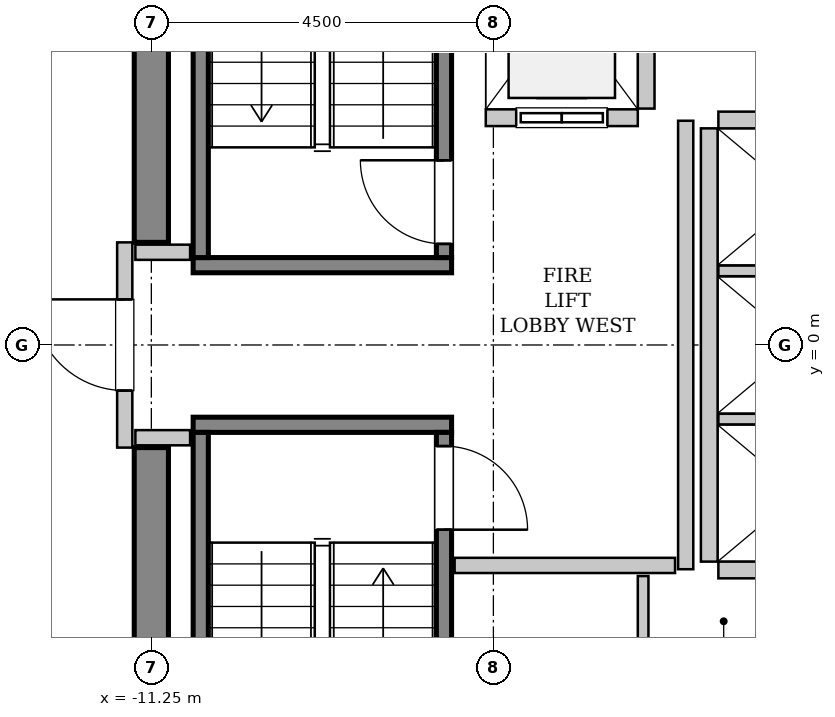
"""IFC4 building model, lengths in metres.
Left out: names, types, materials, properties, quantities, classifications, styles, units other than length and angle.
Written with IfcOpenShell. Run it as: python <this file> out.ifc"""

import sys

from ifc_helpers import new_model, si_unit, direction, frame, frame_2d, origin, place, context, subcontext, project, spatial, rectangle, extrude, source, transform, mapped, element, fill, save


model = new_model("IFC4")
c1 = context("Model", 3, precision=1e-05, world=origin(), true_north=direction((0.0, 1.0)))
c2 = subcontext(c1, "Body", "Model", "MODEL_VIEW")
j1 = project(units=[si_unit("LENGTHUNIT", "METRE"), si_unit("PLANEANGLEUNIT", "RADIAN")], contexts=[c1])
p1 = place(None, origin())
s1 = spatial("IfcSite", under=j1, at=p1, CompositionType="ELEMENT")
p2 = place(p1, origin())
s2 = spatial("IfcBuilding", under=s1, at=p2, CompositionType="ELEMENT")
p3 = place(p2, frame((0.0, 0.0, 256.0)))
s3 = spatial("IfcBuildingStorey", under=s2, at=p3, CompositionType="ELEMENT", Elevation=256.0)
m1 = source(origin(), c2, "Body", "SweptSolid", [
    extrude(rectangle(XDim=7.425, YDim=0.45, at=frame_2d((3.712, 0.0))), origin(), (0.0, 0.0, 1.0), 3.8),
])
for number, where, z_axis, x_axis in (
    (1, (-11.25, -8.775, 0.0), (0.0, 0.0, 1.0), (0.0, 1.0, 0.0)),
    (2, (-11.25, 1.35, 0.0), (0.0, 0.0, 1.0), (0.0, 1.0, 0.0)),
):
    element("IfcWall", number, at=place(p3, frame(where, z_axis=z_axis, x_axis=x_axis)), inside=s3, PredefinedType="SHEAR", context=c2, shape_type="MappedRepresentation", body=[
        mapped(m1, transform((0.0, 0.0, 0.0), x_axis=(1.0, 0.0, 0.0), y_axis=(0.0, 1.0, 0.0), z_axis=(0.0, 0.0, 1.0), scale=1.0)),
    ])
m2 = source(origin(), c2, "Body", "SweptSolid", [
    extrude(rectangle(XDim=3.4, YDim=0.2, at=frame_2d((1.7, 0.0))), origin(), (0.0, 0.0, 1.0), 3.8),
])
p4 = place(p3, frame((-7.3, 1.05, 0.0), z_axis=(0.0, 0.0, 1.0), x_axis=(-1.0, 0.0, 0.0)))
e3 = element("IfcWall", 3, at=p4, inside=s3, PredefinedType="SOLIDWALL", context=c2, shape_type="MappedRepresentation", body=[
    mapped(m2, transform((0.0, 0.0, 0.0), x_axis=(1.0, 0.0, 0.0), y_axis=(0.0, 1.0, 0.0), z_axis=(0.0, 0.0, 1.0), scale=1.0)),
])
m3 = source(origin(), c2, "Body", "SweptSolid", [
    extrude(rectangle(XDim=7.1, YDim=0.2, at=frame_2d((3.55, 0.0))), origin(), (0.0, 0.0, 1.0), 3.8),
])
p5 = place(p3, frame((-7.4, 1.15, 0.0), z_axis=(0.0, 0.0, 1.0), x_axis=(0.0, 1.0, 0.0)))
e4 = element("IfcWall", 4, at=p5, inside=s3, PredefinedType="SOLIDWALL", context=c2, shape_type="MappedRepresentation", body=[
    mapped(m3, transform((0.0, 0.0, 0.0), x_axis=(1.0, 0.0, 0.0), y_axis=(0.0, 1.0, 0.0), z_axis=(0.0, 0.0, 1.0), scale=1.0)),
])
p6 = place(p5, frame((0.18, 0.0, 0.0)))
e5 = element("IfcOpeningElement", 5, at=p6, cuts=e4, PredefinedType="OPENING", context=c2, shape_type="SweptSolid", body=[
    extrude(rectangle(XDim=1.1, YDim=2.15, at=frame_2d((0.55, 1.075))), frame((0.0, 0.11, 0.0), z_axis=(0.0, -1.0, 0.0), x_axis=(1.0, 0.0, 0.0)), (0.0, 0.0, 1.0), 0.22),
])
p7 = place(p3, frame((-10.6, 1.15, 0.0), z_axis=(0.0, 0.0, 1.0), x_axis=(0.0, 1.0, 0.0)))
e6 = element("IfcWall", 6, at=p7, inside=s3, PredefinedType="SOLIDWALL", context=c2, shape_type="MappedRepresentation", body=[
    mapped(m3, transform((0.0, 0.0, 0.0), x_axis=(1.0, 0.0, 0.0), y_axis=(0.0, 1.0, 0.0), z_axis=(0.0, 0.0, 1.0), scale=1.0)),
])
p8 = place(p3, frame((-10.7, -1.05, 0.0), z_axis=(0.0, 0.0, 1.0), x_axis=(1.0, 0.0, 0.0)))
e7 = element("IfcWall", 7, at=p8, inside=s3, PredefinedType="SOLIDWALL", context=c2, shape_type="MappedRepresentation", body=[
    mapped(m2, transform((0.0, 0.0, 0.0), x_axis=(1.0, 0.0, 0.0), y_axis=(0.0, 1.0, 0.0), z_axis=(0.0, 0.0, 1.0), scale=1.0)),
])
p9 = place(p3, frame((-10.6, -1.15, 0.0), z_axis=(0.0, 0.0, 1.0), x_axis=(0.0, -1.0, 0.0)))
e8 = element("IfcWall", 8, at=p9, inside=s3, PredefinedType="SOLIDWALL", context=c2, shape_type="MappedRepresentation", body=[
    mapped(m3, transform((0.0, 0.0, 0.0), x_axis=(1.0, 0.0, 0.0), y_axis=(0.0, 1.0, 0.0), z_axis=(0.0, 0.0, 1.0), scale=1.0)),
])
p10 = place(p3, frame((-7.4, -1.15, 0.0), z_axis=(0.0, 0.0, 1.0), x_axis=(0.0, -1.0, 0.0)))
e9 = element("IfcWall", 9, at=p10, inside=s3, PredefinedType="SOLIDWALL", context=c2, shape_type="MappedRepresentation", body=[
    mapped(m3, transform((0.0, 0.0, 0.0), x_axis=(1.0, 0.0, 0.0), y_axis=(0.0, 1.0, 0.0), z_axis=(0.0, 0.0, 1.0), scale=1.0)),
])
p11 = place(p10, frame((0.18, 0.0, 0.0)))
e10 = element("IfcOpeningElement", 10, at=p11, cuts=e9, PredefinedType="OPENING", context=c2, shape_type="SweptSolid", body=[
    extrude(rectangle(XDim=1.1, YDim=2.15, at=frame_2d((0.55, 1.075))), frame((0.0, 0.11, 0.0), z_axis=(0.0, -1.0, 0.0), x_axis=(1.0, 0.0, 0.0)), (0.0, 0.0, 1.0), 0.22),
])
m4 = source(origin(), c2, "Body", "SweptSolid", [
    extrude(rectangle(XDim=2.0, YDim=0.22, at=frame_2d((1.0, 0.0))), origin(), (0.0, 0.0, 1.0), 3.485),
])
p12 = place(p3, frame((-6.85, 2.99, 0.0), z_axis=(0.0, 0.0, 1.0), x_axis=(1.0, 0.0, 0.0)))
e11 = element("IfcWall", 11, at=p12, inside=s3, PredefinedType="SOLIDWALL", context=c2, shape_type="MappedRepresentation", body=[
    mapped(m4, transform((0.0, 0.0, 0.0), x_axis=(1.0, 0.0, 0.0), y_axis=(0.0, 1.0, 0.0), z_axis=(0.0, 0.0, 1.0), scale=1.0)),
])
p13 = place(p12, frame((0.4, 0.0, 0.0)))
e12 = element("IfcOpeningElement", 12, at=p13, cuts=e11, PredefinedType="OPENING", context=c2, shape_type="SweptSolid", body=[
    extrude(rectangle(XDim=1.2, YDim=2.2, at=frame_2d((0.6, 1.1))), frame((0.0, 0.12, 0.0), z_axis=(0.0, -1.0, 0.0), x_axis=(1.0, 0.0, 0.0)), (0.0, 0.0, 1.0), 0.24),
])
m5 = source(origin(), c2, "Body", "SweptSolid", [
    extrude(rectangle(XDim=2.68, YDim=0.22, at=frame_2d((1.34, 0.0))), origin(), (0.0, 0.0, 1.0), 3.485),
])
p14 = place(p3, frame((-4.74, 3.11, 0.0), z_axis=(0.0, 0.0, 1.0), x_axis=(0.0, 1.0, 0.0)))
e13 = element("IfcWall", 13, at=p14, inside=s3, PredefinedType="SOLIDWALL", context=c2, shape_type="MappedRepresentation", body=[
    mapped(m5, transform((0.0, 0.0, 0.0), x_axis=(1.0, 0.0, 0.0), y_axis=(0.0, 1.0, 0.0), z_axis=(0.0, 0.0, 1.0), scale=1.0)),
])
m6 = source(origin(), c2, "Body", "SweptSolid", [
    extrude(rectangle(XDim=5.7, YDim=0.22, at=frame_2d((2.85, 0.0))), origin(), (0.0, 0.0, 1.0), 3.485),
])
p15 = place(p3, frame((-3.91, 2.85, 0.0), z_axis=(0.0, 0.0, 1.0), x_axis=(0.0, -1.0, 0.0)))
e14 = element("IfcWall", 14, at=p15, inside=s3, PredefinedType="SOLIDWALL", context=c2, shape_type="MappedRepresentation", body=[
    mapped(m6, transform((0.0, 0.0, 0.0), x_axis=(1.0, 0.0, 0.0), y_axis=(0.0, 1.0, 0.0), z_axis=(0.0, 0.0, 1.0), scale=1.0)),
])
m7 = source(origin(), c2, "Body", "SweptSolid", [
    extrude(rectangle(XDim=2.13, YDim=0.22, at=frame_2d((1.065, 0.0))), origin(), (0.0, 0.0, 1.0), 3.485),
])
p16 = place(p3, frame((-3.79, -2.96, 0.0), z_axis=(0.0, 0.0, 1.0), x_axis=(1.0, 0.0, 0.0)))
e15 = element("IfcWall", 15, at=p16, inside=s3, PredefinedType="SOLIDWALL", context=c2, shape_type="MappedRepresentation", body=[
    mapped(m7, transform((0.0, 0.0, 0.0), x_axis=(1.0, 0.0, 0.0), y_axis=(0.0, 1.0, 0.0), z_axis=(0.0, 0.0, 1.0), scale=1.0)),
])
m8 = source(origin(), c2, "Body", "SweptSolid", [
    extrude(rectangle(XDim=2.13, YDim=0.14, at=frame_2d((1.065, 0.0))), origin(), (0.0, 0.0, 1.0), 3.485),
])
for number, where, z_axis, x_axis in (
    (16, (-3.79, -0.975, 0.0), (0.0, 0.0, 1.0), (1.0, 0.0, 0.0)),
    (17, (-3.79, 0.975, 0.0), (0.0, 0.0, 1.0), (1.0, 0.0, 0.0)),
):
    element("IfcWall", number, at=place(p3, frame(where, z_axis=z_axis, x_axis=x_axis)), inside=s3, PredefinedType="PARTITIONING", context=c2, shape_type="MappedRepresentation", body=[
        mapped(m8, transform((0.0, 0.0, 0.0), x_axis=(1.0, 0.0, 0.0), y_axis=(0.0, 1.0, 0.0), z_axis=(0.0, 0.0, 1.0), scale=1.0)),
    ])
p17 = place(p3, frame((-1.66, 2.96, 0.0), z_axis=(0.0, 0.0, 1.0), x_axis=(-1.0, 0.0, 0.0)))
e18 = element("IfcWall", 18, at=p17, inside=s3, PredefinedType="SOLIDWALL", context=c2, shape_type="MappedRepresentation", body=[
    mapped(m7, transform((0.0, 0.0, 0.0), x_axis=(1.0, 0.0, 0.0), y_axis=(0.0, 1.0, 0.0), z_axis=(0.0, 0.0, 1.0), scale=1.0)),
])
m9 = source(origin(), c2, "Body", "SweptSolid", [
    extrude(rectangle(XDim=2.7, YDim=0.2, at=frame_2d((1.35, 0.0))), origin(), (0.0, 0.0, 1.0), 2.575),
])
p18 = place(p3, frame((-11.6, -1.35, 0.0), z_axis=(0.0, 0.0, 1.0), x_axis=(0.0, 1.0, 0.0)))
e19 = element("IfcWall", 19, at=p18, inside=s3, PredefinedType="PARTITIONING", context=c2, shape_type="MappedRepresentation", body=[
    mapped(m9, transform((0.0, 0.0, 0.0), x_axis=(1.0, 0.0, 0.0), y_axis=(0.0, 1.0, 0.0), z_axis=(0.0, 0.0, 1.0), scale=1.0)),
])
p19 = place(p18, frame((0.75, 0.0, 0.0)))
e20 = element("IfcOpeningElement", 20, at=p19, cuts=e19, PredefinedType="OPENING", context=c2, shape_type="SweptSolid", body=[
    extrude(rectangle(XDim=1.2, YDim=2.15, at=frame_2d((0.6, 1.075))), frame((0.0, 0.11, 0.0), z_axis=(0.0, -1.0, 0.0), x_axis=(1.0, 0.0, 0.0)), (0.0, 0.0, 1.0), 0.22),
])
m10 = source(origin(), c2, "Body", "SweptSolid", [
    extrude(rectangle(XDim=5.9, YDim=0.2, at=frame_2d((2.95, 0.0))), origin(), (0.0, 0.0, 1.0), 3.485),
])
p20 = place(p3, frame((-4.22, -2.95, 0.0), z_axis=(0.0, 0.0, 1.0), x_axis=(0.0, 1.0, 0.0)))
e21 = element("IfcWall", 21, at=p20, inside=s3, PredefinedType="PARTITIONING", context=c2, shape_type="MappedRepresentation", body=[
    mapped(m10, transform((0.0, 0.0, 0.0), x_axis=(1.0, 0.0, 0.0), y_axis=(0.0, 1.0, 0.0), z_axis=(0.0, 0.0, 1.0), scale=1.0)),
])
m11 = source(origin(), c2, "Body", "SweptSolid", [
    extrude(rectangle(XDim=2.9, YDim=0.2, at=frame_2d((1.45, 0.0))), origin(), (0.0, 0.0, 1.0), 3.485),
])
p21 = place(p3, frame((-7.26, -2.9, 0.0), z_axis=(0.0, 0.0, 1.0), x_axis=(1.0, 0.0, 0.0)))
e22 = element("IfcWall", 22, at=p21, inside=s3, PredefinedType="PARTITIONING", context=c2, shape_type="MappedRepresentation", body=[
    mapped(m11, transform((0.0, 0.0, 0.0), x_axis=(1.0, 0.0, 0.0), y_axis=(0.0, 1.0, 0.0), z_axis=(0.0, 0.0, 1.0), scale=1.0)),
])
m12 = source(origin(), c2, "Body", "SweptSolid", [
    extrude(rectangle(XDim=0.72, YDim=0.2, at=frame_2d((0.36, 0.0))), origin(), (0.0, 0.0, 1.0), 3.485),
])
for number, where, z_axis, x_axis in (
    (23, (-11.46, 1.22, 0.0), (0.0, 0.0, 1.0), (1.0, 0.0, 0.0)),
    (24, (-11.46, -1.22, 0.0), (0.0, 0.0, 1.0), (1.0, 0.0, 0.0)),
):
    element("IfcWall", number, at=place(p3, frame(where, z_axis=z_axis, x_axis=x_axis)), inside=s3, PredefinedType="PARTITIONING", context=c2, shape_type="MappedRepresentation", body=[
        mapped(m12, transform((0.0, 0.0, 0.0), x_axis=(1.0, 0.0, 0.0), y_axis=(0.0, 1.0, 0.0), z_axis=(0.0, 0.0, 1.0), scale=1.0)),
    ])
m13 = source(origin(), c2, "Body", "SweptSolid", [
    extrude(rectangle(XDim=1.1, YDim=0.14, at=frame_2d((0.55, 0.0))), origin(), (0.0, 0.0, 1.0), 3.485),
])
p22 = place(p3, frame((-4.78, -4.14, 0.0), z_axis=(0.0, 0.0, 1.0), x_axis=(0.0, 1.0, 0.0)))
e25 = element("IfcWall", 25, at=p22, inside=s3, PredefinedType="PARTITIONING", context=c2, shape_type="MappedRepresentation", body=[
    mapped(m13, transform((0.0, 0.0, 0.0), x_axis=(1.0, 0.0, 0.0), y_axis=(0.0, 1.0, 0.0), z_axis=(0.0, 0.0, 1.0), scale=1.0)),
])
m14 = source(origin(), c2, "Body", "SweptSolid", [
    extrude(rectangle(XDim=1.1, YDim=2.15, at=frame_2d((0.55, 1.075))), frame((0.0, 0.025, 0.0), z_axis=(0.0, -1.0, 0.0), x_axis=(1.0, 0.0, 0.0)), (0.0, 0.0, 1.0), 0.05),
])
p23 = place(p6, origin())
e26 = element("IfcDoor", 26, at=p23, inside=s3, OperationType="SINGLE_SWING_RIGHT", PredefinedType="DOOR", context=c2, shape_type="MappedRepresentation", body=[
    mapped(m14, transform((0.0, 0.0, 0.0), x_axis=(1.0, 0.0, 0.0), y_axis=(0.0, 1.0, 0.0), z_axis=(0.0, 0.0, 1.0), scale=1.0)),
])
fill(e5, e26)
p24 = place(p11, origin())
e27 = element("IfcDoor", 27, at=p24, inside=s3, OperationType="SINGLE_SWING_RIGHT", PredefinedType="DOOR", context=c2, shape_type="MappedRepresentation", body=[
    mapped(m14, transform((0.0, 0.0, 0.0), x_axis=(1.0, 0.0, 0.0), y_axis=(0.0, 1.0, 0.0), z_axis=(0.0, 0.0, 1.0), scale=1.0)),
])
fill(e10, e27)
m15 = source(origin(), c2, "Body", "SweptSolid", [
    extrude(rectangle(XDim=1.2, YDim=2.2, at=frame_2d((0.6, 1.1))), frame((0.0, 0.025, 0.0), z_axis=(0.0, -1.0, 0.0), x_axis=(1.0, 0.0, 0.0)), (0.0, 0.0, 1.0), 0.05),
])
p25 = place(p13, origin())
e28 = element("IfcDoor", 28, at=p25, inside=s3, OperationType="SLIDING_TO_LEFT", PredefinedType="DOOR", context=c2, shape_type="MappedRepresentation", body=[
    mapped(m15, transform((0.0, 0.0, 0.0), x_axis=(1.0, 0.0, 0.0), y_axis=(0.0, 1.0, 0.0), z_axis=(0.0, 0.0, 1.0), scale=1.0)),
])
fill(e12, e28)
m16 = source(origin(), c2, "Body", "SweptSolid", [
    extrude(rectangle(XDim=1.2, YDim=2.15, at=frame_2d((0.6, 1.075))), frame((0.0, 0.025, 0.0), z_axis=(0.0, -1.0, 0.0), x_axis=(1.0, 0.0, 0.0)), (0.0, 0.0, 1.0), 0.05),
])
p26 = place(p19, origin())
e29 = element("IfcDoor", 29, at=p26, inside=s3, OperationType="SINGLE_SWING_RIGHT", PredefinedType="DOOR", context=c2, shape_type="MappedRepresentation", body=[
    mapped(m16, transform((0.0, 0.0, 0.0), x_axis=(1.0, 0.0, 0.0), y_axis=(0.0, 1.0, 0.0), z_axis=(0.0, 0.0, 1.0), scale=1.0)),
])
fill(e20, e29)
save(model, sys.argv[1])
